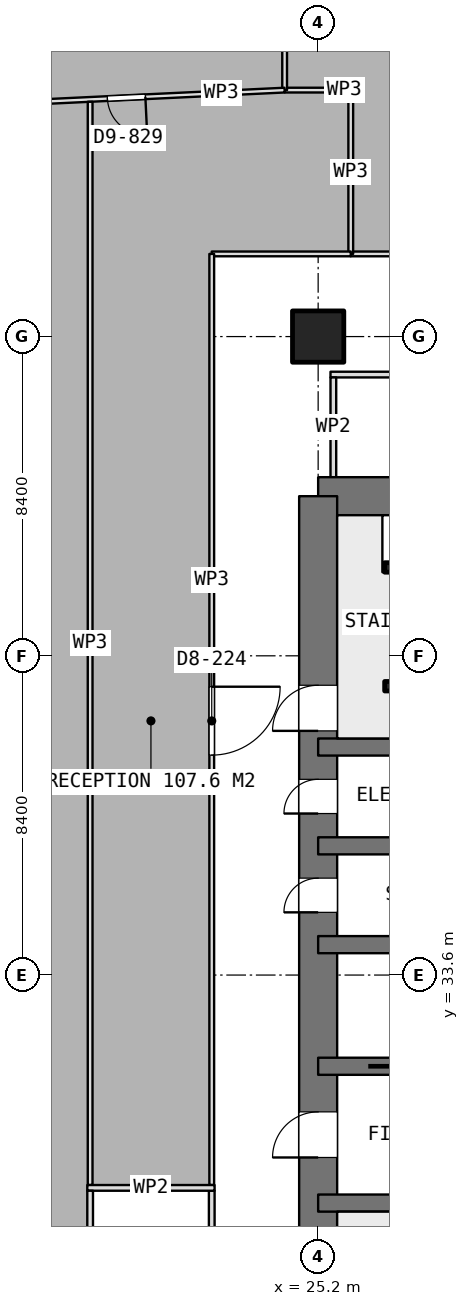
"""IFC4 building model, lengths in metres.
Left out: names, types, materials, properties, quantities, classifications, styles, units other than length and angle.
Written with IfcOpenShell. Run it as: python <this file> out.ifc"""

import sys

from ifc_helpers import new_model, si_unit, direction, frame, frame_2d, origin, origin_2d, place, context, subcontext, project, spatial, rectangle, extrude, element, fill, save


model = new_model("IFC4")
c1 = context("Model", 3, precision=1e-05, world=origin(), true_north=direction((0.0, 1.0)))
c2 = subcontext(c1, "Body", "Model", "MODEL_VIEW")
j1 = project(units=[si_unit("LENGTHUNIT", "METRE"), si_unit("PLANEANGLEUNIT", "RADIAN")], contexts=[c1])
p1 = place(None, origin())
s1 = spatial("IfcSite", under=j1, at=p1, CompositionType="ELEMENT")
p2 = place(p1, origin())
s2 = spatial("IfcBuilding", under=s1, at=p2, CompositionType="ELEMENT")
p3 = place(p2, frame((0.0, 0.0, 202.7)))
s3 = spatial("IfcBuildingStorey", under=s2, at=p3, CompositionType="ELEMENT", Elevation=202.7)
p4 = place(p3, frame((25.2, 46.2, 0.0), z_axis=(0.0, 0.0, 1.0), x_axis=(1.0, 0.0, 0.0)))
e1 = element("IfcWall", 1, at=p4, inside=s3, PredefinedType="SHEAR", context=c2, shape_type="SweptSolid", body=[
    extrude(rectangle(XDim=10.4, YDim=1.0, at=frame_2d((5.2, 0.0))), origin(), (0.0, 0.0, 1.0), 3.75),
])
p5 = place(p3, frame((25.2, 21.0, 0.0), z_axis=(0.0, 0.0, 1.0), x_axis=(0.0, 1.0, 0.0)))
e2 = element("IfcWall", 2, at=p5, inside=s3, PredefinedType="SHEAR", context=c2, shape_type="SweptSolid", body=[
    extrude(rectangle(XDim=25.2, YDim=1.0, at=frame_2d((12.6, 0.0))), origin(), (0.0, 0.0, 1.0), 3.75),
])
p6 = place(p5, frame((7.8, 0.0, 0.0)))
e3 = element("IfcOpeningElement", 3, at=p6, cuts=e2, PredefinedType="OPENING", context=c2, shape_type="SweptSolid", body=[
    extrude(rectangle(XDim=1.2, YDim=2.1, at=frame_2d((0.6, 1.05))), frame((0.0, 0.51, 0.0), z_axis=(0.0, -1.0, 0.0), x_axis=(1.0, 0.0, 0.0)), (0.0, 0.0, 1.0), 1.02),
])
p7 = place(p5, frame((14.25, 0.0, 0.0)))
e4 = element("IfcOpeningElement", 4, at=p7, cuts=e2, PredefinedType="OPENING", context=c2, shape_type="SweptSolid", body=[
    extrude(rectangle(XDim=0.9, YDim=2.1, at=frame_2d((0.45, 1.05))), frame((0.0, 0.51, 0.0), z_axis=(0.0, -1.0, 0.0), x_axis=(1.0, 0.0, 0.0)), (0.0, 0.0, 1.0), 1.02),
])
p8 = place(p5, frame((16.85, 0.0, 0.0)))
e5 = element("IfcOpeningElement", 5, at=p8, cuts=e2, PredefinedType="OPENING", context=c2, shape_type="SweptSolid", body=[
    extrude(rectangle(XDim=0.9, YDim=2.1, at=frame_2d((0.45, 1.05))), frame((0.0, 0.51, 0.0), z_axis=(0.0, -1.0, 0.0), x_axis=(1.0, 0.0, 0.0)), (0.0, 0.0, 1.0), 1.02),
])
p9 = place(p5, frame((19.025, 0.0, 0.0)))
e6 = element("IfcOpeningElement", 6, at=p9, cuts=e2, PredefinedType="OPENING", context=c2, shape_type="SweptSolid", body=[
    extrude(rectangle(XDim=1.2, YDim=2.1, at=frame_2d((0.6, 1.05))), frame((0.0, 0.51, 0.0), z_axis=(0.0, -1.0, 0.0), x_axis=(1.0, 0.0, 0.0)), (0.0, 0.0, 1.0), 1.02),
])
p10 = place(p3, frame((25.2, 27.6, 0.0), z_axis=(0.0, 0.0, 1.0), x_axis=(1.0, 0.0, 0.0)))
e7 = element("IfcWall", 7, at=p10, inside=s3, PredefinedType="SHEAR", context=c2, shape_type="SweptSolid", body=[
    extrude(rectangle(XDim=6.6, YDim=0.45, at=frame_2d((3.3, 0.0))), origin(), (0.0, 0.0, 1.0), 3.75),
])
p11 = place(p10, frame((4.975, 0.0, 0.0)))
e8 = element("IfcOpeningElement", 8, at=p11, cuts=e7, PredefinedType="OPENING", context=c2, shape_type="SweptSolid", body=[
    extrude(rectangle(XDim=1.2, YDim=2.1, at=frame_2d((0.6, 1.05))), frame((0.0, 0.235, 0.0), z_axis=(0.0, -1.0, 0.0), x_axis=(1.0, 0.0, 0.0)), (0.0, 0.0, 1.0), 0.47),
])
p12 = place(p3, frame((25.2, 31.2, 0.0), z_axis=(0.0, 0.0, 1.0), x_axis=(1.0, 0.0, 0.0)))
e9 = element("IfcWall", 9, at=p12, inside=s3, PredefinedType="SHEAR", context=c2, shape_type="SweptSolid", body=[
    extrude(rectangle(XDim=6.6, YDim=0.45, at=frame_2d((3.3, 0.0))), origin(), (0.0, 0.0, 1.0), 3.75),
])
p13 = place(p12, frame((2.65, 0.0, 0.0)))
e10 = element("IfcOpeningElement", 10, at=p13, cuts=e9, PredefinedType="OPENING", context=c2, shape_type="SweptSolid", body=[
    extrude(rectangle(XDim=1.3, YDim=2.1, at=frame_2d((0.65, 1.05))), frame((0.0, 0.235, 0.0), z_axis=(0.0, -1.0, 0.0), x_axis=(1.0, 0.0, 0.0)), (0.0, 0.0, 1.0), 0.47),
])
for number, where, z_axis, x_axis in (
    (11, (25.2, 34.4, 0.0), (0.0, 0.0, 1.0), (1.0, 0.0, 0.0)),
    (12, (25.2, 37.0, 0.0), (0.0, 0.0, 1.0), (1.0, 0.0, 0.0)),
    (13, (25.2, 39.6, 0.0), (0.0, 0.0, 1.0), (1.0, 0.0, 0.0)),
):
    element("IfcWall", number, at=place(p3, frame(where, z_axis=z_axis, x_axis=x_axis)), inside=s3, PredefinedType="SHEAR", context=c2, shape_type="SweptSolid", body=[
        extrude(rectangle(XDim=6.6, YDim=0.45, at=frame_2d((3.3, 0.0))), origin(), (0.0, 0.0, 1.0), 3.75),
    ])
p14 = place(p3, frame((25.2, 50.4, 0.0), z_axis=(0.0, 0.0, 1.0), x_axis=(1.0, 0.0, 0.0)))
e14 = element("IfcColumn", 14, at=p14, inside=s3, PredefinedType="COLUMN", context=c2, shape_type="SweptSolid", body=[
    extrude(rectangle(XDim=1.35, YDim=1.35, at=origin_2d()), origin(), (0.0, 0.0, 1.0), 3.75),
])
p15 = place(p3, frame((25.525, 49.4, 0.0), z_axis=(0.0, 0.0, 1.0), x_axis=(1.0, 0.0, 0.0)))
e15 = element("IfcWall", 15, at=p15, inside=s3, PredefinedType="PARTITIONING", context=c2, shape_type="SweptSolid", body=[
    extrude(rectangle(XDim=9.75, YDim=0.15, at=frame_2d((4.875, 0.0))), origin(), (0.0, 0.0, 1.0), 3.5),
])
p16 = place(p15, frame((4.375, 0.0, 0.0)))
e16 = element("IfcOpeningElement", 16, at=p16, cuts=e15, PredefinedType="OPENING", context=c2, shape_type="SweptSolid", body=[
    extrude(rectangle(XDim=1.0, YDim=2.1, at=frame_2d((0.5, 1.05))), frame((0.0, 0.085, 0.0), z_axis=(0.0, -1.0, 0.0), x_axis=(1.0, 0.0, 0.0)), (0.0, 0.0, 1.0), 0.17),
])
p17 = place(p3, frame((25.6, 46.7, 0.0), z_axis=(0.0, 0.0, 1.0), x_axis=(0.0, 1.0, 0.0)))
e17 = element("IfcWall", 17, at=p17, inside=s3, PredefinedType="PARTITIONING", context=c2, shape_type="SweptSolid", body=[
    extrude(rectangle(XDim=2.625, YDim=0.15, at=frame_2d((1.312, 0.0))), origin(), (0.0, 0.0, 1.0), 3.5),
])
p18 = place(p3, frame((19.125, 28.0, 0.0), z_axis=(0.0, 0.0, 1.0), x_axis=(1.0, 0.0, 0.0)))
e18 = element("IfcWall", 18, at=p18, inside=s3, PredefinedType="PARTITIONING", context=c2, shape_type="SweptSolid", body=[
    extrude(rectangle(XDim=3.35, YDim=0.15, at=frame_2d((1.675, 0.0))), origin(), (0.0, 0.0, 1.0), 3.5),
])
p19 = place(p3, frame((19.2, 21.075, 0.0), z_axis=(0.0, 0.0, 1.0), x_axis=(0.0, 1.0, 0.0)))
e19 = element("IfcWall", 19, at=p19, inside=s3, PredefinedType="PARTITIONING", context=c2, shape_type="SweptSolid", body=[
    extrude(rectangle(XDim=6.85, YDim=0.15, at=frame_2d((3.425, 0.0))), origin(), (0.0, 0.0, 1.0), 3.5),
])
p20 = place(p3, frame((22.4, 21.075, 0.0), z_axis=(0.0, 0.0, 1.0), x_axis=(0.0, 1.0, 0.0)))
e20 = element("IfcWall", 20, at=p20, inside=s3, PredefinedType="PARTITIONING", context=c2, shape_type="SweptSolid", body=[
    extrude(rectangle(XDim=6.85, YDim=0.15, at=frame_2d((3.425, 0.0))), origin(), (0.0, 0.0, 1.0), 3.5),
])
p21 = place(p20, frame((2.925, 0.0, 0.0)))
e21 = element("IfcOpeningElement", 21, at=p21, cuts=e20, PredefinedType="OPENING", context=c2, shape_type="SweptSolid", body=[
    extrude(rectangle(XDim=1.0, YDim=2.1, at=frame_2d((0.5, 1.05))), frame((0.0, 0.085, 0.0), z_axis=(0.0, -1.0, 0.0), x_axis=(1.0, 0.0, 0.0)), (0.0, 0.0, 1.0), 0.17),
])
p22 = place(p3, frame((30.661, 52.575, 0.0), z_axis=(0.0, 0.0, 1.0), x_axis=(-1.0, 0.0, 0.0)))
e22 = element("IfcWall", 22, at=p22, inside=s3, PredefinedType="PARTITIONING", context=c2, shape_type="SweptSolid", body=[
    extrude(rectangle(XDim=4.603, YDim=0.125, at=frame_2d((2.301, 0.0))), origin(), (0.0, 0.0, 1.0), 3.5),
])
p23 = place(p22, frame((1.802, 0.0, 0.0)))
e23 = element("IfcOpeningElement", 23, at=p23, cuts=e22, PredefinedType="OPENING", context=c2, shape_type="SweptSolid", body=[
    extrude(rectangle(XDim=1.0, YDim=2.1, at=frame_2d((0.5, 1.05))), frame((0.0, 0.073, 0.0), z_axis=(0.0, -1.0, 0.0), x_axis=(1.0, 0.0, 0.0)), (0.0, 0.0, 1.0), 0.145),
])
p24 = place(p3, frame((26.058, 52.575, 0.0), z_axis=(0.0, 0.0, 1.0), x_axis=(0.0, 1.0, 0.0)))
e24 = element("IfcWall", 24, at=p24, inside=s3, PredefinedType="PARTITIONING", context=c2, shape_type="SweptSolid", body=[
    extrude(rectangle(XDim=4.31, YDim=0.125, at=frame_2d((2.155, 0.0))), origin(), (0.0, 0.0, 1.0), 3.5),
])
p25 = place(p3, frame((26.058, 56.885, 0.0), z_axis=(0.0, 0.0, 1.0), x_axis=(-1.0, 0.0, 0.0)))
e25 = element("IfcWall", 25, at=p25, inside=s3, PredefinedType="PARTITIONING", context=c2, shape_type="SweptSolid", body=[
    extrude(rectangle(XDim=1.736, YDim=0.125, at=frame_2d((0.868, 0.0))), origin(), (0.0, 0.0, 1.0), 3.5),
])
p26 = place(p3, frame((24.318, 56.885, 0.0), z_axis=(0.0, 0.0, 1.0), x_axis=(0.0, 1.0, 0.0)))
e26 = element("IfcWall", 26, at=p26, inside=s3, PredefinedType="PARTITIONING", context=c2, shape_type="SweptSolid", body=[
    extrude(rectangle(XDim=4.125, YDim=0.125, at=frame_2d((2.062, 0.0))), origin(), (0.0, 0.0, 1.0), 3.5),
])
p27 = place(p3, frame((24.317, 56.885, 0.0), z_axis=(0.0, 0.0, 1.0), x_axis=(-0.998859973319, -0.047736293327, 0.0)))
e27 = element("IfcWall", 27, at=p27, inside=s3, PredefinedType="PARTITIONING", context=c2, shape_type="SweptSolid", body=[
    extrude(rectangle(XDim=8.336, YDim=0.125, at=frame_2d((4.168, 0.0))), origin(), (0.0, 0.0, 1.0), 3.5),
])
p28 = place(p27, frame((3.668, 0.0, 0.0)))
e28 = element("IfcOpeningElement", 28, at=p28, cuts=e27, PredefinedType="OPENING", context=c2, shape_type="SweptSolid", body=[
    extrude(rectangle(XDim=1.0, YDim=2.1, at=frame_2d((0.5, 1.05))), frame((0.0, 0.073, 0.0), z_axis=(0.0, -1.0, 0.0), x_axis=(1.0, 0.0, 0.0)), (0.0, 0.0, 1.0), 0.145),
])
p29 = place(p3, frame((26.058, 52.575, 0.0), z_axis=(0.0, 0.0, 1.0), x_axis=(-1.0, 0.0, 0.0)))
e29 = element("IfcWall", 29, at=p29, inside=s3, PredefinedType="PARTITIONING", context=c2, shape_type="SweptSolid", body=[
    extrude(rectangle(XDim=3.658, YDim=0.125, at=frame_2d((1.829, 0.0))), origin(), (0.0, 0.0, 1.0), 3.5),
])
p30 = place(p3, frame((22.4, 52.575, 0.0), z_axis=(0.0, 0.0, 1.0), x_axis=(0.0, -1.0, 0.0)))
e30 = element("IfcWall", 30, at=p30, inside=s3, PredefinedType="PARTITIONING", context=c2, shape_type="SweptSolid", body=[
    extrude(rectangle(XDim=24.5, YDim=0.125, at=frame_2d((12.25, 0.0))), origin(), (0.0, 0.0, 1.0), 3.5),
])
p31 = place(p30, frame((11.388, 0.0, 0.0)))
e31 = element("IfcOpeningElement", 31, at=p31, cuts=e30, PredefinedType="OPENING", context=c2, shape_type="SweptSolid", body=[
    extrude(rectangle(XDim=1.8, YDim=2.1, at=frame_2d((0.9, 1.05))), frame((0.0, 0.073, 0.0), z_axis=(0.0, -1.0, 0.0), x_axis=(1.0, 0.0, 0.0)), (0.0, 0.0, 1.0), 0.145),
])
p32 = place(p3, frame((19.2, 28.075, 0.0), z_axis=(0.0, 0.0, 1.0), x_axis=(0.0, 1.0, 0.0)))
e32 = element("IfcWall", 32, at=p32, inside=s3, PredefinedType="PARTITIONING", context=c2, shape_type="SweptSolid", body=[
    extrude(rectangle(XDim=28.503, YDim=0.125, at=frame_2d((14.251, 0.0))), origin(), (0.0, 0.0, 1.0), 3.5),
])
for number, where, z_axis, x_axis in (
    (33, (27.075, 41.2, 0.0), (0.0, 0.0, 1.0), (1.0, 0.0, 0.0)),
    (34, (27.075, 44.325, 0.0), (0.0, 0.0, 1.0), (1.0, 0.0, 0.0)),
):
    element("IfcColumn", number, at=place(p3, frame(where, z_axis=z_axis, x_axis=x_axis)), inside=s3, PredefinedType="COLUMN", context=c2, shape_type="SweptSolid", body=[
        extrude(rectangle(XDim=0.25, YDim=0.25, at=origin_2d()), origin(), (0.0, 0.0, 1.0), 3.75),
    ])
p33 = place(p6, origin())
e35 = element("IfcDoor", 35, at=p33, inside=s3, OperationType="SINGLE_SWING_LEFT", PredefinedType="DOOR", context=c2, shape_type="SweptSolid", body=[
    extrude(rectangle(XDim=1.2, YDim=2.1, at=frame_2d((0.6, 1.05))), frame((0.0, 0.025, 0.0), z_axis=(0.0, -1.0, 0.0), x_axis=(1.0, 0.0, 0.0)), (0.0, 0.0, 1.0), 0.05),
])
fill(e3, e35)
p34 = place(p7, origin())
e36 = element("IfcDoor", 36, at=p34, inside=s3, OperationType="SINGLE_SWING_LEFT", PredefinedType="DOOR", context=c2, shape_type="SweptSolid", body=[
    extrude(rectangle(XDim=0.9, YDim=2.1, at=frame_2d((0.45, 1.05))), frame((0.0, 0.025, 0.0), z_axis=(0.0, -1.0, 0.0), x_axis=(1.0, 0.0, 0.0)), (0.0, 0.0, 1.0), 0.05),
])
fill(e4, e36)
p35 = place(p8, origin())
e37 = element("IfcDoor", 37, at=p35, inside=s3, OperationType="SINGLE_SWING_LEFT", PredefinedType="DOOR", context=c2, shape_type="SweptSolid", body=[
    extrude(rectangle(XDim=0.9, YDim=2.1, at=frame_2d((0.45, 1.05))), frame((0.0, 0.025, 0.0), z_axis=(0.0, -1.0, 0.0), x_axis=(1.0, 0.0, 0.0)), (0.0, 0.0, 1.0), 0.05),
])
fill(e5, e37)
p36 = place(p31, origin())
e38 = element("IfcDoor", 38, at=p36, inside=s3, OperationType="DOUBLE_DOOR_SINGLE_SWING", PredefinedType="DOOR", context=c2, shape_type="SweptSolid", body=[
    extrude(rectangle(XDim=1.8, YDim=2.1, at=frame_2d((0.9, 1.05))), frame((0.0, 0.025, 0.0), z_axis=(0.0, -1.0, 0.0), x_axis=(1.0, 0.0, 0.0)), (0.0, 0.0, 1.0), 0.05),
])
fill(e31, e38)
p37 = place(p28, origin())
e39 = element("IfcDoor", 39, at=p37, inside=s3, OperationType="SINGLE_SWING_LEFT", PredefinedType="DOOR", context=c2, shape_type="SweptSolid", body=[
    extrude(rectangle(XDim=1.0, YDim=2.1, at=frame_2d((0.5, 1.05))), frame((0.0, 0.025, 0.0), z_axis=(0.0, -1.0, 0.0), x_axis=(1.0, 0.0, 0.0)), (0.0, 0.0, 1.0), 0.05),
])
fill(e28, e39)
p38 = place(p9, origin())
e40 = element("IfcDoor", 40, at=p38, inside=s3, OperationType="SINGLE_SWING_RIGHT", PredefinedType="DOOR", context=c2, shape_type="SweptSolid", body=[
    extrude(rectangle(XDim=1.2, YDim=2.1, at=frame_2d((0.6, 1.05))), frame((0.0, 0.025, 0.0), z_axis=(0.0, -1.0, 0.0), x_axis=(1.0, 0.0, 0.0)), (0.0, 0.0, 1.0), 0.05),
])
fill(e6, e40)
save(model, sys.argv[1])
